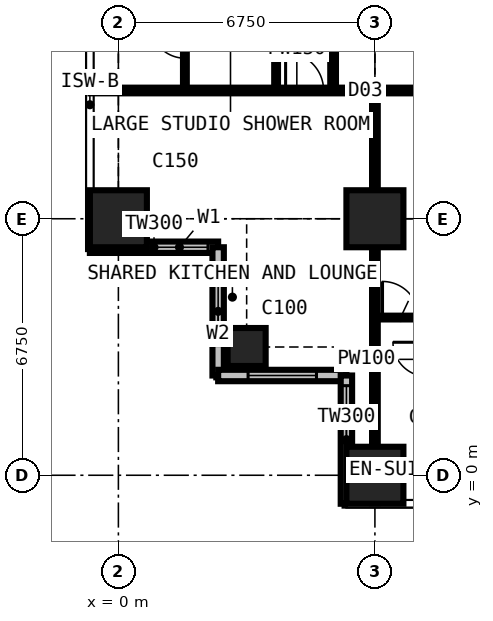
"""IFC4 building model, lengths in metres.
Left out: names, types, materials, properties, quantities, classifications, styles, units other than length and angle.
Written with IfcOpenShell. Run it as: python <this file> out.ifc"""

import sys

from ifc_helpers import new_model, si_unit, direction, frame, frame_2d, origin, origin_2d, place, context, subcontext, project, spatial, rectangle, extrude, element, fill, save


model = new_model("IFC4")
c1 = context("Model", 3, precision=1e-05, world=origin(), true_north=direction((0.0, 1.0)))
c2 = subcontext(c1, "Body", "Model", "MODEL_VIEW")
j1 = project(units=[si_unit("LENGTHUNIT", "METRE"), si_unit("PLANEANGLEUNIT", "RADIAN")], contexts=[c1])
p1 = place(None, origin())
s1 = spatial("IfcSite", under=j1, at=p1, CompositionType="ELEMENT")
p2 = place(p1, origin())
s2 = spatial("IfcBuilding", under=s1, at=p2, CompositionType="ELEMENT")
p3 = place(p2, frame((0.0, 0.0, 116.1)))
s3 = spatial("IfcBuildingStorey", under=s2, at=p3, CompositionType="ELEMENT", Elevation=116.1)
p4 = place(p3, frame((0.0, 6.75, 0.0), z_axis=(0.0, 0.0, 1.0), x_axis=(1.0, 0.0, 0.0)))
e1 = element("IfcColumn", 1, at=p4, inside=s3, PredefinedType="COLUMN", context=c2, shape_type="SweptSolid", body=[
    extrude(rectangle(XDim=1.5, YDim=1.5, at=origin_2d()), origin(), (0.0, 0.0, 1.0), 3.6),
])
p5 = place(p3, frame((3.375, 3.375, 0.0), z_axis=(0.0, 0.0, 1.0), x_axis=(1.0, 0.0, 0.0)))
e2 = element("IfcColumn", 2, at=p5, inside=s3, PredefinedType="COLUMN", context=c2, shape_type="SweptSolid", body=[
    extrude(rectangle(XDim=1.0, YDim=1.0, at=origin_2d()), origin(), (0.0, 0.0, 1.0), 3.6),
])
for number, where, z_axis, x_axis in (
    (3, (6.75, 0.0, 0.0), (0.0, 0.0, 1.0), (1.0, 0.0, 0.0)),
    (4, (6.75, 6.75, 0.0), (0.0, 0.0, 1.0), (1.0, 0.0, 0.0)),
):
    element("IfcColumn", number, at=place(p3, frame(where, z_axis=z_axis, x_axis=x_axis)), inside=s3, PredefinedType="COLUMN", context=c2, shape_type="SweptSolid", body=[
        extrude(rectangle(XDim=1.5, YDim=1.5, at=origin_2d()), origin(), (0.0, 0.0, 1.0), 3.6),
    ])
p6 = place(p3, frame((-0.75, 6.0, 0.0), z_axis=(0.0, 0.0, 1.0), x_axis=(1.0, 0.0, 0.0)))
e5 = element("IfcWall", 5, at=p6, inside=s3, PredefinedType="SOLIDWALL", context=c2, shape_type="SweptSolid", body=[
    extrude(rectangle(XDim=3.375, YDim=0.3, at=frame_2d((1.688, 0.0))), origin(), (0.0, 0.0, 1.0), 3.375),
])
p7 = place(p6, frame((1.607, 0.0, 0.9)))
e6 = element("IfcOpeningElement", 6, at=p7, cuts=e5, PredefinedType="OPENING", context=c2, shape_type="SweptSolid", body=[
    extrude(rectangle(XDim=1.5, YDim=1.8, at=frame_2d((0.75, 0.9))), frame((0.0, 0.16, 0.0), z_axis=(0.0, -1.0, 0.0), x_axis=(1.0, 0.0, 0.0)), (0.0, 0.0, 1.0), 0.32),
])
p8 = place(p3, frame((2.625, 6.0, 0.0), z_axis=(0.0, 0.0, 1.0), x_axis=(0.0, -1.0, 0.0)))
e7 = element("IfcWall", 7, at=p8, inside=s3, PredefinedType="SOLIDWALL", context=c2, shape_type="SweptSolid", body=[
    extrude(rectangle(XDim=3.375, YDim=0.3, at=frame_2d((1.688, 0.0))), origin(), (0.0, 0.0, 1.0), 3.375),
])
p9 = place(p8, frame((0.788, 0.0, 0.6)))
e8 = element("IfcOpeningElement", 8, at=p9, cuts=e7, PredefinedType="OPENING", context=c2, shape_type="SweptSolid", body=[
    extrude(rectangle(XDim=1.8, YDim=2.1, at=frame_2d((0.9, 1.05))), frame((0.0, 0.16, 0.0), z_axis=(0.0, -1.0, 0.0), x_axis=(1.0, 0.0, 0.0)), (0.0, 0.0, 1.0), 0.32),
])
p10 = place(p3, frame((2.625, 2.625, 0.0), z_axis=(0.0, 0.0, 1.0), x_axis=(1.0, 0.0, 0.0)))
e9 = element("IfcWall", 9, at=p10, inside=s3, PredefinedType="SOLIDWALL", context=c2, shape_type="SweptSolid", body=[
    extrude(rectangle(XDim=3.375, YDim=0.3, at=frame_2d((1.688, 0.0))), origin(), (0.0, 0.0, 1.0), 3.375),
])
p11 = place(p10, frame((0.788, 0.0, 0.6)))
e10 = element("IfcOpeningElement", 10, at=p11, cuts=e9, PredefinedType="OPENING", context=c2, shape_type="SweptSolid", body=[
    extrude(rectangle(XDim=1.8, YDim=2.1, at=frame_2d((0.9, 1.05))), frame((0.0, 0.16, 0.0), z_axis=(0.0, -1.0, 0.0), x_axis=(1.0, 0.0, 0.0)), (0.0, 0.0, 1.0), 0.32),
])
p12 = place(p3, frame((6.0, 2.625, 0.0), z_axis=(0.0, 0.0, 1.0), x_axis=(0.0, -1.0, 0.0)))
e11 = element("IfcWall", 11, at=p12, inside=s3, PredefinedType="SOLIDWALL", context=c2, shape_type="SweptSolid", body=[
    extrude(rectangle(XDim=3.375, YDim=0.3, at=frame_2d((1.688, 0.0))), origin(), (0.0, 0.0, 1.0), 3.375),
])
p13 = place(p12, frame((0.268, 0.0, 0.9)))
e12 = element("IfcOpeningElement", 12, at=p13, cuts=e11, PredefinedType="OPENING", context=c2, shape_type="SweptSolid", body=[
    extrude(rectangle(XDim=1.5, YDim=1.8, at=frame_2d((0.75, 0.9))), frame((0.0, 0.16, 0.0), z_axis=(0.0, -1.0, 0.0), x_axis=(1.0, 0.0, 0.0)), (0.0, 0.0, 1.0), 0.32),
])
p14 = place(p3, frame((-0.734, 10.125, 0.0), z_axis=(0.0, 0.0, 1.0), x_axis=(1.0, 0.0, 0.0)))
e13 = element("IfcWall", 13, at=p14, inside=s3, PredefinedType="PARTITIONING", context=c2, shape_type="SweptSolid", body=[
    extrude(rectangle(XDim=10.859, YDim=0.15, at=frame_2d((5.429, 0.0))), origin(), (0.0, 0.0, 1.0), 3.375),
])
p15 = place(p14, frame((5.134, 0.0, 0.0)))
e14 = element("IfcOpeningElement", 14, at=p15, cuts=e13, PredefinedType="OPENING", context=c2, shape_type="SweptSolid", body=[
    extrude(rectangle(XDim=1.0, YDim=2.2, at=frame_2d((0.5, 1.1))), frame((0.0, 0.085, 0.0), z_axis=(0.0, -1.0, 0.0), x_axis=(1.0, 0.0, 0.0)), (0.0, 0.0, 1.0), 0.17),
])
p16 = place(p3, frame((1.75, 10.125, 0.0), z_axis=(0.0, 0.0, 1.0), x_axis=(0.0, 1.0, 0.0)))
e15 = element("IfcWall", 15, at=p16, inside=s3, PredefinedType="PARTITIONING", context=c2, shape_type="SweptSolid", body=[
    extrude(rectangle(XDim=2.6, YDim=0.1, at=frame_2d((1.3, 0.0))), origin(), (0.0, 0.0, 1.0), 3.375),
])
p17 = place(p16, frame((0.85, 0.0, 0.0)))
e16 = element("IfcOpeningElement", 16, at=p17, cuts=e15, PredefinedType="OPENING", context=c2, shape_type="SweptSolid", body=[
    extrude(rectangle(XDim=0.9, YDim=2.2, at=frame_2d((0.45, 1.1))), frame((0.0, 0.06, 0.0), z_axis=(0.0, -1.0, 0.0), x_axis=(1.0, 0.0, 0.0)), (0.0, 0.0, 1.0), 0.12),
])
p18 = place(p3, frame((4.15, 10.125, 0.0), z_axis=(0.0, 0.0, 1.0), x_axis=(0.0, 1.0, 0.0)))
e17 = element("IfcWall", 17, at=p18, inside=s3, PredefinedType="PARTITIONING", context=c2, shape_type="SweptSolid", body=[
    extrude(rectangle(XDim=16.875, YDim=0.1, at=frame_2d((8.438, 0.0))), origin(), (0.0, 0.0, 1.0), 3.375),
])
p19 = place(p18, frame((13.7, 0.0, 0.0)))
e18 = element("IfcOpeningElement", 18, at=p19, cuts=e17, PredefinedType="OPENING", context=c2, shape_type="SweptSolid", body=[
    extrude(rectangle(XDim=0.95, YDim=2.2, at=frame_2d((0.475, 1.1))), frame((0.0, 0.06, 0.0), z_axis=(0.0, -1.0, 0.0), x_axis=(1.0, 0.0, 0.0)), (0.0, 0.0, 1.0), 0.12),
])
p20 = place(p18, frame((4.2, 0.0, 0.0)))
e19 = element("IfcOpeningElement", 19, at=p20, cuts=e17, PredefinedType="OPENING", context=c2, shape_type="SweptSolid", body=[
    extrude(rectangle(XDim=0.95, YDim=2.2, at=frame_2d((0.475, 1.1))), frame((0.0, 0.06, 0.0), z_axis=(0.0, -1.0, 0.0), x_axis=(1.0, 0.0, 0.0)), (0.0, 0.0, 1.0), 0.12),
])
p21 = place(p18, frame((10.95, 0.0, 0.0)))
e20 = element("IfcOpeningElement", 20, at=p21, cuts=e17, PredefinedType="OPENING", context=c2, shape_type="SweptSolid", body=[
    extrude(rectangle(XDim=0.95, YDim=2.2, at=frame_2d((0.475, 1.1))), frame((0.0, 0.06, 0.0), z_axis=(0.0, -1.0, 0.0), x_axis=(1.0, 0.0, 0.0)), (0.0, 0.0, 1.0), 0.12),
])
p22 = place(p3, frame((5.65, 10.125, 0.0), z_axis=(0.0, 0.0, 1.0), x_axis=(0.0, 1.0, 0.0)))
e21 = element("IfcWall", 21, at=p22, inside=s3, PredefinedType="PARTITIONING", context=c2, shape_type="SweptSolid", body=[
    extrude(rectangle(XDim=10.762, YDim=0.15, at=frame_2d((5.381, 0.0))), origin(), (0.0, 0.0, 1.0), 3.375),
])
p23 = place(p22, frame((4.9, 0.0, 0.0)))
e22 = element("IfcOpeningElement", 22, at=p23, cuts=e21, PredefinedType="OPENING", context=c2, shape_type="SweptSolid", body=[
    extrude(rectangle(XDim=0.95, YDim=2.2, at=frame_2d((0.475, 1.1))), frame((0.0, 0.085, 0.0), z_axis=(0.0, -1.0, 0.0), x_axis=(1.0, 0.0, 0.0)), (0.0, 0.0, 1.0), 0.17),
])
p24 = place(p3, frame((6.75, -0.734, 0.0), z_axis=(0.0, 0.0, 1.0), x_axis=(0.0, 1.0, 0.0)))
e23 = element("IfcWall", 23, at=p24, inside=s3, PredefinedType="PARTITIONING", context=c2, shape_type="SweptSolid", body=[
    extrude(rectangle(XDim=10.859, YDim=0.15, at=frame_2d((5.429, 0.0))), origin(), (0.0, 0.0, 1.0), 2.877),
])
p25 = place(p3, frame((6.75, 4.15, 0.0), z_axis=(0.0, 0.0, 1.0), x_axis=(1.0, 0.0, 0.0)))
e24 = element("IfcWall", 24, at=p25, inside=s3, PredefinedType="PARTITIONING", context=c2, shape_type="SweptSolid", body=[
    extrude(rectangle(XDim=23.625, YDim=0.1, at=frame_2d((11.812, 0.0))), origin(), (0.0, 0.0, 1.0), 3.375),
])
p26 = place(p25, frame((0.2, 0.0, 0.0)))
e25 = element("IfcOpeningElement", 25, at=p26, cuts=e24, PredefinedType="OPENING", context=c2, shape_type="SweptSolid", body=[
    extrude(rectangle(XDim=0.95, YDim=2.2, at=frame_2d((0.475, 1.1))), frame((0.0, 0.06, 0.0), z_axis=(0.0, -1.0, 0.0), x_axis=(1.0, 0.0, 0.0)), (0.0, 0.0, 1.0), 0.12),
])
p27 = place(p25, frame((3.625, 0.0, 0.0)))
e26 = element("IfcOpeningElement", 26, at=p27, cuts=e24, PredefinedType="OPENING", context=c2, shape_type="SweptSolid", body=[
    extrude(rectangle(XDim=0.95, YDim=2.2, at=frame_2d((0.475, 1.1))), frame((0.0, 0.06, 0.0), z_axis=(0.0, -1.0, 0.0), x_axis=(1.0, 0.0, 0.0)), (0.0, 0.0, 1.0), 0.12),
])
p28 = place(p25, frame((7.0, 0.0, 0.0)))
e27 = element("IfcOpeningElement", 27, at=p28, cuts=e24, PredefinedType="OPENING", context=c2, shape_type="SweptSolid", body=[
    extrude(rectangle(XDim=0.95, YDim=2.2, at=frame_2d((0.475, 1.1))), frame((0.0, 0.06, 0.0), z_axis=(0.0, -1.0, 0.0), x_axis=(1.0, 0.0, 0.0)), (0.0, 0.0, 1.0), 0.12),
])
p29 = place(p25, frame((10.375, 0.0, 0.0)))
e28 = element("IfcOpeningElement", 28, at=p29, cuts=e24, PredefinedType="OPENING", context=c2, shape_type="SweptSolid", body=[
    extrude(rectangle(XDim=0.95, YDim=2.2, at=frame_2d((0.475, 1.1))), frame((0.0, 0.06, 0.0), z_axis=(0.0, -1.0, 0.0), x_axis=(1.0, 0.0, 0.0)), (0.0, 0.0, 1.0), 0.12),
])
p30 = place(p25, frame((18.475, 0.0, 0.0)))
e29 = element("IfcOpeningElement", 29, at=p30, cuts=e24, PredefinedType="OPENING", context=c2, shape_type="SweptSolid", body=[
    extrude(rectangle(XDim=0.95, YDim=2.2, at=frame_2d((0.475, 1.1))), frame((0.0, 0.06, 0.0), z_axis=(0.0, -1.0, 0.0), x_axis=(1.0, 0.0, 0.0)), (0.0, 0.0, 1.0), 0.12),
])
p31 = place(p25, frame((13.7, 0.0, 0.0)))
e30 = element("IfcOpeningElement", 30, at=p31, cuts=e24, PredefinedType="OPENING", context=c2, shape_type="SweptSolid", body=[
    extrude(rectangle(XDim=0.95, YDim=2.2, at=frame_2d((0.475, 1.1))), frame((0.0, 0.06, 0.0), z_axis=(0.0, -1.0, 0.0), x_axis=(1.0, 0.0, 0.0)), (0.0, 0.0, 1.0), 0.12),
])
p32 = place(p7, origin())
e31 = element("IfcWindow", 31, at=p32, inside=s3, PartitioningType="SINGLE_PANEL", PredefinedType="WINDOW", context=c2, shape_type="SweptSolid", body=[
    extrude(rectangle(XDim=1.5, YDim=1.8, at=frame_2d((0.75, 0.9))), frame((0.0, 0.03, 0.0), z_axis=(0.0, -1.0, 0.0), x_axis=(1.0, 0.0, 0.0)), (0.0, 0.0, 1.0), 0.06),
])
fill(e6, e31)
p33 = place(p9, origin())
e32 = element("IfcWindow", 32, at=p33, inside=s3, PartitioningType="SINGLE_PANEL", PredefinedType="WINDOW", context=c2, shape_type="SweptSolid", body=[
    extrude(rectangle(XDim=1.8, YDim=2.1, at=frame_2d((0.9, 1.05))), frame((0.0, 0.03, 0.0), z_axis=(0.0, -1.0, 0.0), x_axis=(1.0, 0.0, 0.0)), (0.0, 0.0, 1.0), 0.06),
])
fill(e8, e32)
p34 = place(p11, origin())
e33 = element("IfcWindow", 33, at=p34, inside=s3, PartitioningType="SINGLE_PANEL", PredefinedType="WINDOW", context=c2, shape_type="SweptSolid", body=[
    extrude(rectangle(XDim=1.8, YDim=2.1, at=frame_2d((0.9, 1.05))), frame((0.0, 0.03, 0.0), z_axis=(0.0, -1.0, 0.0), x_axis=(1.0, 0.0, 0.0)), (0.0, 0.0, 1.0), 0.06),
])
fill(e10, e33)
p35 = place(p13, origin())
e34 = element("IfcWindow", 34, at=p35, inside=s3, PartitioningType="SINGLE_PANEL", PredefinedType="WINDOW", context=c2, shape_type="SweptSolid", body=[
    extrude(rectangle(XDim=1.5, YDim=1.8, at=frame_2d((0.75, 0.9))), frame((0.0, 0.03, 0.0), z_axis=(0.0, -1.0, 0.0), x_axis=(1.0, 0.0, 0.0)), (0.0, 0.0, 1.0), 0.06),
])
fill(e12, e34)
p36 = place(p15, origin())
e35 = element("IfcDoor", 35, at=p36, inside=s3, OperationType="SINGLE_SWING_LEFT", PredefinedType="DOOR", context=c2, shape_type="SweptSolid", body=[
    extrude(rectangle(XDim=1.0, YDim=2.2, at=frame_2d((0.5, 1.1))), frame((0.0, 0.025, 0.0), z_axis=(0.0, -1.0, 0.0), x_axis=(1.0, 0.0, 0.0)), (0.0, 0.0, 1.0), 0.05),
])
fill(e14, e35)
p37 = place(p26, origin())
e36 = element("IfcDoor", 36, at=p37, inside=s3, OperationType="SINGLE_SWING_LEFT", PredefinedType="DOOR", context=c2, shape_type="SweptSolid", body=[
    extrude(rectangle(XDim=0.95, YDim=2.2, at=frame_2d((0.475, 1.1))), frame((0.0, 0.025, 0.0), z_axis=(0.0, -1.0, 0.0), x_axis=(1.0, 0.0, 0.0)), (0.0, 0.0, 1.0), 0.05),
])
fill(e25, e36)
p38 = place(p17, origin())
e37 = element("IfcDoor", 37, at=p38, inside=s3, OperationType="SINGLE_SWING_RIGHT", PredefinedType="DOOR", context=c2, shape_type="SweptSolid", body=[
    extrude(rectangle(XDim=0.9, YDim=2.2, at=frame_2d((0.45, 1.1))), frame((0.0, 0.025, 0.0), z_axis=(0.0, -1.0, 0.0), x_axis=(1.0, 0.0, 0.0)), (0.0, 0.0, 1.0), 0.05),
])
fill(e16, e37)
save(model, sys.argv[1])
